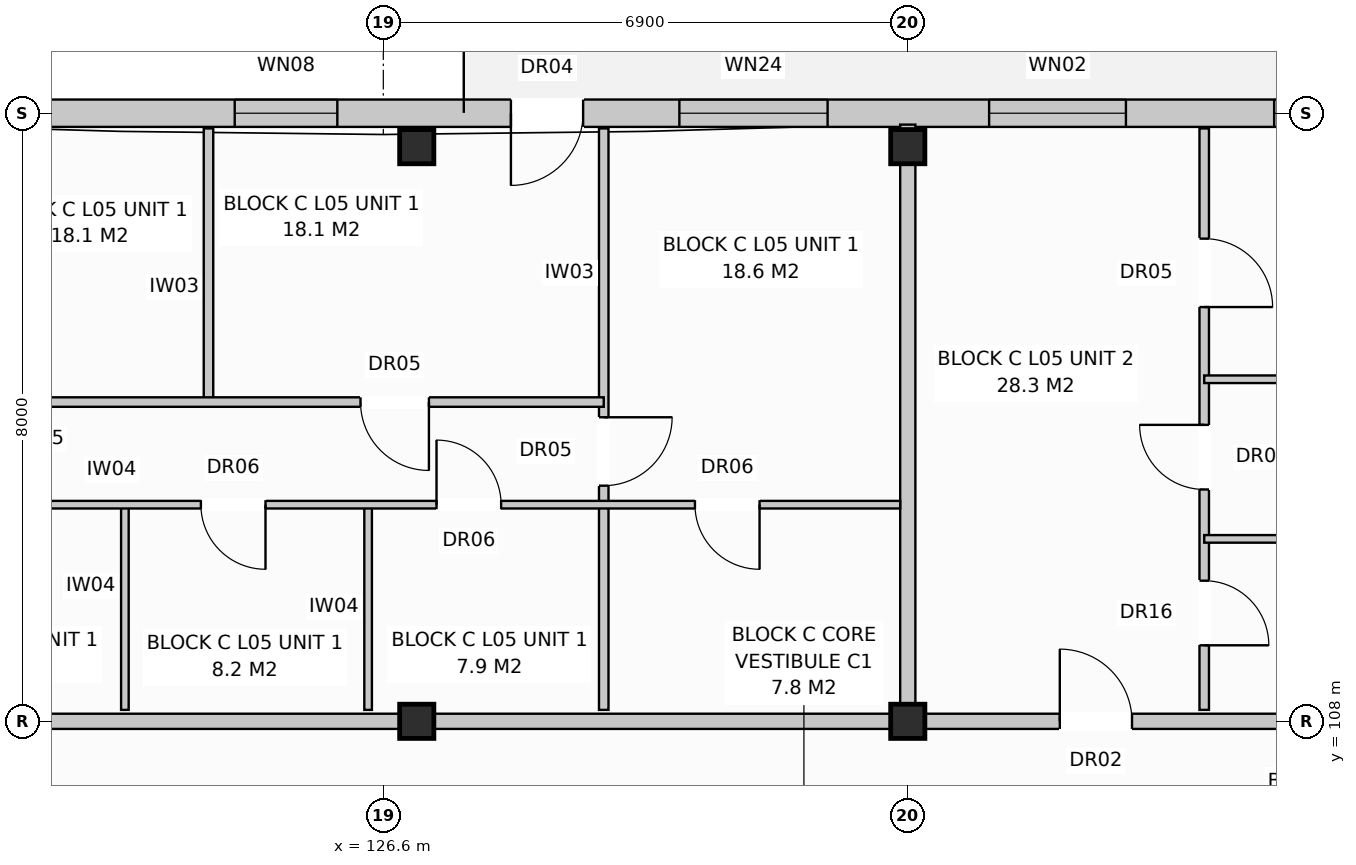
"""IFC4 building model, lengths in metres.
Left out: names, types, materials, properties, quantities, classifications, styles, units other than length and angle.
Written with IfcOpenShell. Run it as: python <this file> out.ifc"""

import sys

from ifc_helpers import new_model, si_unit, direction, frame, frame_2d, origin, origin_with_axes, origin_2d, place, context, subcontext, project, spatial, rectangle, extrude, element, fill, save


model = new_model("IFC4")
c1 = context("Model", 3, precision=1e-05, world=origin(), true_north=direction((0.0, 1.0)))
c2 = subcontext(c1, "Body", "Model", "MODEL_VIEW")
j1 = project(units=[si_unit("LENGTHUNIT", "METRE"), si_unit("PLANEANGLEUNIT", "RADIAN")], contexts=[c1])
p1 = place(None, origin())
s1 = spatial("IfcSite", under=j1, at=p1, CompositionType="ELEMENT")
p2 = place(p1, origin())
s2 = spatial("IfcBuilding", under=s1, at=p2, CompositionType="ELEMENT")
p3 = place(p2, frame((0.0, 0.0, 17.6)))
s3 = spatial("IfcBuildingStorey", under=s2, at=p3, CompositionType="ELEMENT", Elevation=17.6)
for number, where, z_axis, x_axis in (
    (1, (127.04, 108.0, 0.0), (0.0, 0.0, 1.0), (1.0, 0.0, 0.0)),
    (2, (127.04, 115.56, 0.0), (0.0, 0.0, 1.0), (1.0, 0.0, 0.0)),
    (3, (133.5, 108.0, 0.0), (0.0, 0.0, 1.0), (1.0, 0.0, 0.0)),
    (4, (133.5, 115.56, 0.0), (0.0, 0.0, 1.0), (1.0, 0.0, 0.0)),
):
    element("IfcColumn", number, at=place(p3, frame(where, z_axis=z_axis, x_axis=x_axis)), inside=s3, PredefinedType="COLUMN", context=c2, shape_type="SweptSolid", body=[
        extrude(rectangle(XDim=0.45, YDim=0.45, at=origin_2d()), origin(), (0.0, 0.0, 1.0), 3.2),
    ])
p4 = place(p3, frame((112.97, 116.0, 0.0), z_axis=(0.0, 0.0, 1.0), x_axis=(1.0, 0.0, 0.0)))
e5 = element("IfcWall", 5, at=p4, inside=s3, PredefinedType="STANDARD", context=c2, shape_type="SweptSolid", body=[
    extrude(rectangle(XDim=54.86, YDim=0.36, at=frame_2d((27.43, 0.0))), origin(), (0.0, 0.0, 1.0), 2.95),
])
p5 = place(p4, frame((4.891, 0.0, 0.0)))
e6 = element("IfcOpeningElement", 6, at=p5, cuts=e5, PredefinedType="OPENING", context=c2, shape_type="SweptSolid", body=[
    extrude(rectangle(XDim=0.95, YDim=2.1, at=frame_2d((0.475, 1.05))), frame((0.0, 0.192, 0.0), z_axis=(0.0, -1.0, 0.0), x_axis=(1.0, 0.0, 0.0)), (0.0, 0.0, 1.0), 0.384),
])
p6 = place(p4, frame((15.309, 0.0, 0.0)))
e7 = element("IfcOpeningElement", 7, at=p6, cuts=e5, PredefinedType="OPENING", context=c2, shape_type="SweptSolid", body=[
    extrude(rectangle(XDim=0.95, YDim=2.1, at=frame_2d((0.475, 1.05))), frame((0.0, 0.192, 0.0), z_axis=(0.0, -1.0, 0.0), x_axis=(1.0, 0.0, 0.0)), (0.0, 0.0, 1.0), 0.384),
])
p7 = place(p4, frame((31.409, 0.0, 0.0)))
e8 = element("IfcOpeningElement", 8, at=p7, cuts=e5, PredefinedType="OPENING", context=c2, shape_type="SweptSolid", body=[
    extrude(rectangle(XDim=0.95, YDim=2.1, at=frame_2d((0.475, 1.05))), frame((0.0, 0.192, 0.0), z_axis=(0.0, -1.0, 0.0), x_axis=(1.0, 0.0, 0.0)), (0.0, 0.0, 1.0), 0.384),
])
p8 = place(p4, frame((44.309, 0.0, 0.0)))
e9 = element("IfcOpeningElement", 9, at=p8, cuts=e5, PredefinedType="OPENING", context=c2, shape_type="SweptSolid", body=[
    extrude(rectangle(XDim=0.95, YDim=2.1, at=frame_2d((0.475, 1.05))), frame((0.0, 0.192, 0.0), z_axis=(0.0, -1.0, 0.0), x_axis=(1.0, 0.0, 0.0)), (0.0, 0.0, 1.0), 0.384),
])
p9 = place(p4, frame((2.025, 0.0, 0.8)))
e10 = element("IfcOpeningElement", 10, at=p9, cuts=e5, PredefinedType="OPENING", context=c2, shape_type="SweptSolid", body=[
    extrude(rectangle(XDim=1.95, YDim=1.65, at=frame_2d((0.975, 0.825))), frame((0.0, 0.192, 0.0), z_axis=(0.0, -1.0, 0.0), x_axis=(1.0, 0.0, 0.0)), (0.0, 0.0, 1.0), 0.384),
])
p10 = place(p4, frame((8.15, 0.0, 0.72)))
e11 = element("IfcOpeningElement", 11, at=p10, cuts=e5, PredefinedType="OPENING", context=c2, shape_type="SweptSolid", body=[
    extrude(rectangle(XDim=1.1, YDim=1.5, at=frame_2d((0.55, 0.75))), frame((0.0, 0.192, 0.0), z_axis=(0.0, -1.0, 0.0), x_axis=(1.0, 0.0, 0.0)), (0.0, 0.0, 1.0), 0.384),
])
p11 = place(p4, frame((11.675, 0.0, 0.85)))
e12 = element("IfcOpeningElement", 12, at=p11, cuts=e5, PredefinedType="OPENING", context=c2, shape_type="SweptSolid", body=[
    extrude(rectangle(XDim=1.35, YDim=1.6, at=frame_2d((0.675, 0.8))), frame((0.0, 0.192, 0.0), z_axis=(0.0, -1.0, 0.0), x_axis=(1.0, 0.0, 0.0)), (0.0, 0.0, 1.0), 0.384),
])
p12 = place(p4, frame((17.525, 0.0, 0.8)))
e13 = element("IfcOpeningElement", 13, at=p12, cuts=e5, PredefinedType="OPENING", context=c2, shape_type="SweptSolid", body=[
    extrude(rectangle(XDim=1.95, YDim=1.65, at=frame_2d((0.975, 0.825))), frame((0.0, 0.192, 0.0), z_axis=(0.0, -1.0, 0.0), x_axis=(1.0, 0.0, 0.0)), (0.0, 0.0, 1.0), 0.384),
])
p13 = place(p4, frame((21.6, 0.0, 0.8)))
e14 = element("IfcOpeningElement", 14, at=p13, cuts=e5, PredefinedType="OPENING", context=c2, shape_type="SweptSolid", body=[
    extrude(rectangle(XDim=1.8, YDim=1.7, at=frame_2d((0.9, 0.85))), frame((0.0, 0.192, 0.0), z_axis=(0.0, -1.0, 0.0), x_axis=(1.0, 0.0, 0.0)), (0.0, 0.0, 1.0), 0.384),
])
p14 = place(p4, frame((25.35, 0.0, 0.72)))
e15 = element("IfcOpeningElement", 15, at=p14, cuts=e5, PredefinedType="OPENING", context=c2, shape_type="SweptSolid", body=[
    extrude(rectangle(XDim=1.1, YDim=1.5, at=frame_2d((0.55, 0.75))), frame((0.0, 0.192, 0.0), z_axis=(0.0, -1.0, 0.0), x_axis=(1.0, 0.0, 0.0)), (0.0, 0.0, 1.0), 0.384),
])
p15 = place(p4, frame((29.125, 0.0, 0.8)))
e16 = element("IfcOpeningElement", 16, at=p15, cuts=e5, PredefinedType="OPENING", context=c2, shape_type="SweptSolid", body=[
    extrude(rectangle(XDim=1.95, YDim=1.65, at=frame_2d((0.975, 0.825))), frame((0.0, 0.192, 0.0), z_axis=(0.0, -1.0, 0.0), x_axis=(1.0, 0.0, 0.0)), (0.0, 0.0, 1.0), 0.384),
])
p16 = place(p4, frame((34.9, 0.0, 0.8)))
e17 = element("IfcOpeningElement", 17, at=p16, cuts=e5, PredefinedType="OPENING", context=c2, shape_type="SweptSolid", body=[
    extrude(rectangle(XDim=1.8, YDim=1.7, at=frame_2d((0.9, 0.85))), frame((0.0, 0.192, 0.0), z_axis=(0.0, -1.0, 0.0), x_axis=(1.0, 0.0, 0.0)), (0.0, 0.0, 1.0), 0.384),
])
p17 = place(p4, frame((38.45, 0.0, 0.72)))
e18 = element("IfcOpeningElement", 18, at=p17, cuts=e5, PredefinedType="OPENING", context=c2, shape_type="SweptSolid", body=[
    extrude(rectangle(XDim=1.1, YDim=1.5, at=frame_2d((0.55, 0.75))), frame((0.0, 0.192, 0.0), z_axis=(0.0, -1.0, 0.0), x_axis=(1.0, 0.0, 0.0)), (0.0, 0.0, 1.0), 0.384),
])
p18 = place(p4, frame((42.55, 0.0, 0.72)))
e19 = element("IfcOpeningElement", 19, at=p18, cuts=e5, PredefinedType="OPENING", context=c2, shape_type="SweptSolid", body=[
    extrude(rectangle(XDim=1.1, YDim=1.5, at=frame_2d((0.55, 0.75))), frame((0.0, 0.192, 0.0), z_axis=(0.0, -1.0, 0.0), x_axis=(1.0, 0.0, 0.0)), (0.0, 0.0, 1.0), 0.384),
])
p19 = place(p4, frame((45.8, 0.0, 0.8)))
e20 = element("IfcOpeningElement", 20, at=p19, cuts=e5, PredefinedType="OPENING", context=c2, shape_type="SweptSolid", body=[
    extrude(rectangle(XDim=1.8, YDim=1.7, at=frame_2d((0.9, 0.85))), frame((0.0, 0.192, 0.0), z_axis=(0.0, -1.0, 0.0), x_axis=(1.0, 0.0, 0.0)), (0.0, 0.0, 1.0), 0.384),
])
p20 = place(p4, frame((49.15, 0.0, 0.72)))
e21 = element("IfcOpeningElement", 21, at=p20, cuts=e5, PredefinedType="OPENING", context=c2, shape_type="SweptSolid", body=[
    extrude(rectangle(XDim=1.9, YDim=1.85, at=frame_2d((0.95, 0.925))), frame((0.0, 0.192, 0.0), z_axis=(0.0, -1.0, 0.0), x_axis=(1.0, 0.0, 0.0)), (0.0, 0.0, 1.0), 0.384),
])
p21 = place(p4, frame((52.95, 0.0, 0.72)))
e22 = element("IfcOpeningElement", 22, at=p21, cuts=e5, PredefinedType="OPENING", context=c2, shape_type="SweptSolid", body=[
    extrude(rectangle(XDim=1.1, YDim=1.5, at=frame_2d((0.55, 0.75))), frame((0.0, 0.192, 0.0), z_axis=(0.0, -1.0, 0.0), x_axis=(1.0, 0.0, 0.0)), (0.0, 0.0, 1.0), 0.384),
])
p22 = place(p3, frame((133.5, 108.15, 0.0), z_axis=(0.0, 0.0, 1.0), x_axis=(0.0, 1.0, 0.0)))
e23 = element("IfcWall", 23, at=p22, inside=s3, PredefinedType="PARTITIONING", context=c2, shape_type="SweptSolid", body=[
    extrude(rectangle(XDim=7.7, YDim=0.2, at=frame_2d((3.85, 0.0))), origin(), (0.0, 0.0, 1.0), 2.39),
])
p23 = place(p3, frame((112.8, 108.0, 0.0), z_axis=(0.0, 0.0, 1.0), x_axis=(1.0, 0.0, 0.0)))
e24 = element("IfcWall", 24, at=p23, inside=s3, PredefinedType="PARTITIONING", context=c2, shape_type="SweptSolid", body=[
    extrude(rectangle(XDim=20.7, YDim=0.2, at=frame_2d((10.35, 0.0))), origin(), (0.0, 0.0, 1.0), 2.39),
])
p24 = place(p23, frame((2.4, 0.0, 0.0)))
e25 = element("IfcOpeningElement", 25, at=p24, cuts=e24, PredefinedType="OPENING", context=c2, shape_type="SweptSolid", body=[
    extrude(rectangle(XDim=0.95, YDim=2.15, at=frame_2d((0.475, 1.075))), frame((0.0, 0.112, 0.0), z_axis=(0.0, -1.0, 0.0), x_axis=(1.0, 0.0, 0.0)), (0.0, 0.0, 1.0), 0.224),
])
p25 = place(p3, frame((123.2, 108.15, 0.0), z_axis=(0.0, 0.0, 1.0), x_axis=(0.0, 1.0, 0.0)))
e26 = element("IfcWall", 26, at=p25, inside=s3, PredefinedType="PARTITIONING", context=c2, shape_type="SweptSolid", body=[
    extrude(rectangle(XDim=2.7, YDim=0.1, at=frame_2d((1.35, 0.0))), origin(), (0.0, 0.0, 1.0), 2.95),
])
p26 = place(p3, frame((126.4, 108.15, 0.0), z_axis=(0.0, 0.0, 1.0), x_axis=(0.0, 1.0, 0.0)))
e27 = element("IfcWall", 27, at=p26, inside=s3, PredefinedType="PARTITIONING", context=c2, shape_type="SweptSolid", body=[
    extrude(rectangle(XDim=2.7, YDim=0.1, at=frame_2d((1.35, 0.0))), origin(), (0.0, 0.0, 1.0), 2.39),
])
p27 = place(p3, frame((124.3, 112.2, 0.0), z_axis=(0.0, 0.0, 1.0), x_axis=(0.0, 1.0, 0.0)))
e28 = element("IfcWall", 28, at=p27, inside=s3, PredefinedType="PARTITIONING", context=c2, shape_type="SweptSolid", body=[
    extrude(rectangle(XDim=3.6, YDim=0.125, at=frame_2d((1.8, 0.0))), origin(), (0.0, 0.0, 1.0), 2.95),
])
p28 = place(p3, frame((129.5, 108.15, 0.0), z_axis=(0.0, 0.0, 1.0), x_axis=(0.0, 1.0, 0.0)))
e29 = element("IfcWall", 29, at=p28, inside=s3, PredefinedType="PARTITIONING", context=c2, shape_type="SweptSolid", body=[
    extrude(rectangle(XDim=7.65, YDim=0.125, at=frame_2d((3.825, 0.0))), origin(), (0.0, 0.0, 1.0), 2.95),
])
p29 = place(p28, frame((2.95, 0.0, 0.0)))
e30 = element("IfcOpeningElement", 30, at=p29, cuts=e29, PredefinedType="OPENING", context=c2, shape_type="SweptSolid", body=[
    extrude(rectangle(XDim=0.9, YDim=2.1, at=frame_2d((0.45, 1.05))), frame((0.0, 0.074, 0.0), z_axis=(0.0, -1.0, 0.0), x_axis=(1.0, 0.0, 0.0)), (0.0, 0.0, 1.0), 0.149),
])
p30 = place(p3, frame((119.1, 110.85, 0.0), z_axis=(0.0, 0.0, 1.0), x_axis=(1.0, 0.0, 0.0)))
e31 = element("IfcWall", 31, at=p30, inside=s3, PredefinedType="PARTITIONING", context=c2, shape_type="SweptSolid", body=[
    extrude(rectangle(XDim=14.3, YDim=0.1, at=frame_2d((7.15, 0.0))), origin(), (0.0, 0.0, 1.0), 2.95),
])
p31 = place(p30, frame((1.6, 0.0, 0.0)))
e32 = element("IfcOpeningElement", 32, at=p31, cuts=e31, PredefinedType="OPENING", context=c2, shape_type="SweptSolid", body=[
    extrude(rectangle(XDim=0.9, YDim=2.1, at=frame_2d((0.45, 1.05))), frame((0.0, 0.062, 0.0), z_axis=(0.0, -1.0, 0.0), x_axis=(1.0, 0.0, 0.0)), (0.0, 0.0, 1.0), 0.124),
])
p32 = place(p30, frame((5.1, 0.0, 0.0)))
e33 = element("IfcOpeningElement", 33, at=p32, cuts=e31, PredefinedType="OPENING", context=c2, shape_type="SweptSolid", body=[
    extrude(rectangle(XDim=0.85, YDim=2.05, at=frame_2d((0.425, 1.025))), frame((0.0, 0.062, 0.0), z_axis=(0.0, -1.0, 0.0), x_axis=(1.0, 0.0, 0.0)), (0.0, 0.0, 1.0), 0.124),
])
p33 = place(p30, frame((8.2, 0.0, 0.0)))
e34 = element("IfcOpeningElement", 34, at=p33, cuts=e31, PredefinedType="OPENING", context=c2, shape_type="SweptSolid", body=[
    extrude(rectangle(XDim=0.85, YDim=2.05, at=frame_2d((0.425, 1.025))), frame((0.0, 0.062, 0.0), z_axis=(0.0, -1.0, 0.0), x_axis=(1.0, 0.0, 0.0)), (0.0, 0.0, 1.0), 0.124),
])
p34 = place(p30, frame((11.6, 0.0, 0.0)))
e35 = element("IfcOpeningElement", 35, at=p34, cuts=e31, PredefinedType="OPENING", context=c2, shape_type="SweptSolid", body=[
    extrude(rectangle(XDim=0.85, YDim=2.05, at=frame_2d((0.425, 1.025))), frame((0.0, 0.062, 0.0), z_axis=(0.0, -1.0, 0.0), x_axis=(1.0, 0.0, 0.0)), (0.0, 0.0, 1.0), 0.124),
])
p35 = place(p3, frame((119.1, 112.2, 0.0), z_axis=(0.0, 0.0, 1.0), x_axis=(1.0, 0.0, 0.0)))
e36 = element("IfcWall", 36, at=p35, inside=s3, PredefinedType="PARTITIONING", context=c2, shape_type="SweptSolid", body=[
    extrude(rectangle(XDim=10.4, YDim=0.125, at=frame_2d((5.2, 0.0))), origin(), (0.0, 0.0, 1.0), 2.95),
])
p36 = place(p35, frame((2.0, 0.0, 0.0)))
e37 = element("IfcOpeningElement", 37, at=p36, cuts=e36, PredefinedType="OPENING", context=c2, shape_type="SweptSolid", body=[
    extrude(rectangle(XDim=0.9, YDim=2.1, at=frame_2d((0.45, 1.05))), frame((0.0, 0.074, 0.0), z_axis=(0.0, -1.0, 0.0), x_axis=(1.0, 0.0, 0.0)), (0.0, 0.0, 1.0), 0.149),
])
p37 = place(p35, frame((7.2, 0.0, 0.0)))
e38 = element("IfcOpeningElement", 38, at=p37, cuts=e36, PredefinedType="OPENING", context=c2, shape_type="SweptSolid", body=[
    extrude(rectangle(XDim=0.9, YDim=2.1, at=frame_2d((0.45, 1.05))), frame((0.0, 0.074, 0.0), z_axis=(0.0, -1.0, 0.0), x_axis=(1.0, 0.0, 0.0)), (0.0, 0.0, 1.0), 0.149),
])
p38 = place(p3, frame((133.5, 108.0, 0.0), z_axis=(0.0, 0.0, 1.0), x_axis=(1.0, 0.0, 0.0)))
e39 = element("IfcWall", 39, at=p38, inside=s3, PredefinedType="PARTITIONING", context=c2, shape_type="SweptSolid", body=[
    extrude(rectangle(XDim=6.9, YDim=0.2, at=frame_2d((3.45, 0.0))), origin(), (0.0, 0.0, 1.0), 2.39),
])
p39 = place(p38, frame((2.0, 0.0, 0.0)))
e40 = element("IfcOpeningElement", 40, at=p39, cuts=e39, PredefinedType="OPENING", context=c2, shape_type="SweptSolid", body=[
    extrude(rectangle(XDim=0.95, YDim=2.15, at=frame_2d((0.475, 1.075))), frame((0.0, 0.112, 0.0), z_axis=(0.0, -1.0, 0.0), x_axis=(1.0, 0.0, 0.0)), (0.0, 0.0, 1.0), 0.224),
])
p40 = place(p3, frame((137.4, 108.15, 0.0), z_axis=(0.0, 0.0, 1.0), x_axis=(0.0, 1.0, 0.0)))
e41 = element("IfcWall", 41, at=p40, inside=s3, PredefinedType="PARTITIONING", context=c2, shape_type="SweptSolid", body=[
    extrude(rectangle(XDim=7.65, YDim=0.125, at=frame_2d((3.825, 0.0))), origin(), (0.0, 0.0, 1.0), 2.95),
])
p41 = place(p40, frame((0.85, 0.0, 0.0)))
e42 = element("IfcOpeningElement", 42, at=p41, cuts=e41, PredefinedType="OPENING", context=c2, shape_type="SweptSolid", body=[
    extrude(rectangle(XDim=0.85, YDim=2.1, at=frame_2d((0.425, 1.05))), frame((0.0, 0.074, 0.0), z_axis=(0.0, -1.0, 0.0), x_axis=(1.0, 0.0, 0.0)), (0.0, 0.0, 1.0), 0.149),
])
p42 = place(p40, frame((2.9, 0.0, 0.0)))
e43 = element("IfcOpeningElement", 43, at=p42, cuts=e41, PredefinedType="OPENING", context=c2, shape_type="SweptSolid", body=[
    extrude(rectangle(XDim=0.85, YDim=2.05, at=frame_2d((0.425, 1.025))), frame((0.0, 0.074, 0.0), z_axis=(0.0, -1.0, 0.0), x_axis=(1.0, 0.0, 0.0)), (0.0, 0.0, 1.0), 0.149),
])
p43 = place(p40, frame((5.3, 0.0, 0.0)))
e44 = element("IfcOpeningElement", 44, at=p43, cuts=e41, PredefinedType="OPENING", context=c2, shape_type="SweptSolid", body=[
    extrude(rectangle(XDim=0.9, YDim=2.1, at=frame_2d((0.45, 1.05))), frame((0.0, 0.074, 0.0), z_axis=(0.0, -1.0, 0.0), x_axis=(1.0, 0.0, 0.0)), (0.0, 0.0, 1.0), 0.149),
])
for number, where, z_axis, x_axis in (
    (45, (137.4, 110.4, 0.0), (0.0, 0.0, 1.0), (1.0, 0.0, 0.0)),
    (46, (137.4, 112.5, 0.0), (0.0, 0.0, 1.0), (1.0, 0.0, 0.0)),
):
    element("IfcWall", number, at=place(p3, frame(where, z_axis=z_axis, x_axis=x_axis)), inside=s3, PredefinedType="PARTITIONING", context=c2, shape_type="SweptSolid", body=[
        extrude(rectangle(XDim=2.9, YDim=0.1, at=frame_2d((1.45, 0.0))), origin(), (0.0, 0.0, 1.0), 2.95),
    ])
p44 = place(p6, frame((0.95, 0.0, 0.0), z_axis=(0.0, 0.0, 1.0), x_axis=(-1.0, 0.0, 0.0)))
e47 = element("IfcDoor", 47, at=p44, inside=s3, OperationType="SINGLE_SWING_LEFT", PredefinedType="DOOR", context=c2, shape_type="SweptSolid", body=[
    extrude(rectangle(XDim=0.95, YDim=2.1, at=frame_2d((0.475, 1.05))), frame((0.0, 0.025, 0.0), z_axis=(0.0, -1.0, 0.0), x_axis=(1.0, 0.0, 0.0)), (0.0, 0.0, 1.0), 0.05),
])
fill(e7, e47)
p45 = place(p11, origin_with_axes())
e48 = element("IfcWindow", 48, at=p45, inside=s3, PartitioningType="SINGLE_PANEL", PredefinedType="WINDOW", context=c2, shape_type="SweptSolid", body=[
    extrude(rectangle(XDim=1.35, YDim=1.6, at=frame_2d((0.675, 0.8))), frame((0.0, 0.03, 0.0), z_axis=(0.0, -1.0, 0.0), x_axis=(1.0, 0.0, 0.0)), (0.0, 0.0, 1.0), 0.06),
])
fill(e12, e48)
p46 = place(p12, origin_with_axes())
e49 = element("IfcWindow", 49, at=p46, inside=s3, PartitioningType="SINGLE_PANEL", PredefinedType="WINDOW", context=c2, shape_type="SweptSolid", body=[
    extrude(rectangle(XDim=1.95, YDim=1.65, at=frame_2d((0.975, 0.825))), frame((0.0, 0.03, 0.0), z_axis=(0.0, -1.0, 0.0), x_axis=(1.0, 0.0, 0.0)), (0.0, 0.0, 1.0), 0.06),
])
fill(e13, e49)
p47 = place(p13, origin_with_axes())
e50 = element("IfcWindow", 50, at=p47, inside=s3, PartitioningType="SINGLE_PANEL", PredefinedType="WINDOW", context=c2, shape_type="SweptSolid", body=[
    extrude(rectangle(XDim=1.8, YDim=1.7, at=frame_2d((0.9, 0.85))), frame((0.0, 0.03, 0.0), z_axis=(0.0, -1.0, 0.0), x_axis=(1.0, 0.0, 0.0)), (0.0, 0.0, 1.0), 0.06),
])
fill(e14, e50)
p48 = place(p14, origin_with_axes())
e51 = element("IfcWindow", 51, at=p48, inside=s3, PartitioningType="SINGLE_PANEL", PredefinedType="WINDOW", context=c2, shape_type="SweptSolid", body=[
    extrude(rectangle(XDim=1.1, YDim=1.5, at=frame_2d((0.55, 0.75))), frame((0.0, 0.03, 0.0), z_axis=(0.0, -1.0, 0.0), x_axis=(1.0, 0.0, 0.0)), (0.0, 0.0, 1.0), 0.06),
])
fill(e15, e51)
p49 = place(p29, frame((0.9, 0.0, 0.0), z_axis=(0.0, 0.0, 1.0), x_axis=(-1.0, 0.0, 0.0)))
e52 = element("IfcDoor", 52, at=p49, inside=s3, OperationType="SINGLE_SWING_RIGHT", PredefinedType="DOOR", context=c2, shape_type="SweptSolid", body=[
    extrude(rectangle(XDim=0.9, YDim=2.1, at=frame_2d((0.45, 1.05))), frame((0.0, 0.025, 0.0), z_axis=(0.0, -1.0, 0.0), x_axis=(1.0, 0.0, 0.0)), (0.0, 0.0, 1.0), 0.05),
])
fill(e30, e52)
p50 = place(p32, frame((0.85, 0.0, 0.0), z_axis=(0.0, 0.0, 1.0), x_axis=(-1.0, 0.0, 0.0)))
e53 = element("IfcDoor", 53, at=p50, inside=s3, OperationType="SINGLE_SWING_RIGHT", PredefinedType="DOOR", context=c2, shape_type="SweptSolid", body=[
    extrude(rectangle(XDim=0.85, YDim=2.05, at=frame_2d((0.425, 1.025))), frame((0.0, 0.025, 0.0), z_axis=(0.0, -1.0, 0.0), x_axis=(1.0, 0.0, 0.0)), (0.0, 0.0, 1.0), 0.05),
])
fill(e33, e53)
p51 = place(p33, origin_with_axes())
e54 = element("IfcDoor", 54, at=p51, inside=s3, OperationType="SINGLE_SWING_LEFT", PredefinedType="DOOR", context=c2, shape_type="SweptSolid", body=[
    extrude(rectangle(XDim=0.85, YDim=2.05, at=frame_2d((0.425, 1.025))), frame((0.0, 0.025, 0.0), z_axis=(0.0, -1.0, 0.0), x_axis=(1.0, 0.0, 0.0)), (0.0, 0.0, 1.0), 0.05),
])
fill(e34, e54)
p52 = place(p34, frame((0.85, 0.0, 0.0), z_axis=(0.0, 0.0, 1.0), x_axis=(-1.0, 0.0, 0.0)))
e55 = element("IfcDoor", 55, at=p52, inside=s3, OperationType="SINGLE_SWING_RIGHT", PredefinedType="DOOR", context=c2, shape_type="SweptSolid", body=[
    extrude(rectangle(XDim=0.85, YDim=2.05, at=frame_2d((0.425, 1.025))), frame((0.0, 0.025, 0.0), z_axis=(0.0, -1.0, 0.0), x_axis=(1.0, 0.0, 0.0)), (0.0, 0.0, 1.0), 0.05),
])
fill(e35, e55)
p53 = place(p37, frame((0.9, 0.0, 0.0), z_axis=(0.0, 0.0, 1.0), x_axis=(-1.0, 0.0, 0.0)))
e56 = element("IfcDoor", 56, at=p53, inside=s3, OperationType="SINGLE_SWING_RIGHT", PredefinedType="DOOR", context=c2, shape_type="SweptSolid", body=[
    extrude(rectangle(XDim=0.9, YDim=2.1, at=frame_2d((0.45, 1.05))), frame((0.0, 0.025, 0.0), z_axis=(0.0, -1.0, 0.0), x_axis=(1.0, 0.0, 0.0)), (0.0, 0.0, 1.0), 0.05),
])
fill(e38, e56)
p54 = place(p39, origin_with_axes())
e57 = element("IfcDoor", 57, at=p54, inside=s3, OperationType="SINGLE_SWING_LEFT", PredefinedType="DOOR", context=c2, shape_type="SweptSolid", body=[
    extrude(rectangle(XDim=0.95, YDim=2.15, at=frame_2d((0.475, 1.075))), frame((0.0, 0.025, 0.0), z_axis=(0.0, -1.0, 0.0), x_axis=(1.0, 0.0, 0.0)), (0.0, 0.0, 1.0), 0.05),
])
fill(e40, e57)
p55 = place(p41, frame((0.85, 0.0, 0.0), z_axis=(0.0, 0.0, 1.0), x_axis=(-1.0, 0.0, 0.0)))
e58 = element("IfcDoor", 58, at=p55, inside=s3, OperationType="SINGLE_SWING_LEFT", PredefinedType="DOOR", context=c2, shape_type="SweptSolid", body=[
    extrude(rectangle(XDim=0.85, YDim=2.1, at=frame_2d((0.425, 1.05))), frame((0.0, 0.025, 0.0), z_axis=(0.0, -1.0, 0.0), x_axis=(1.0, 0.0, 0.0)), (0.0, 0.0, 1.0), 0.05),
])
fill(e42, e58)
p56 = place(p42, origin_with_axes())
e59 = element("IfcDoor", 59, at=p56, inside=s3, OperationType="SINGLE_SWING_RIGHT", PredefinedType="DOOR", context=c2, shape_type="SweptSolid", body=[
    extrude(rectangle(XDim=0.85, YDim=2.05, at=frame_2d((0.425, 1.025))), frame((0.0, 0.025, 0.0), z_axis=(0.0, -1.0, 0.0), x_axis=(1.0, 0.0, 0.0)), (0.0, 0.0, 1.0), 0.05),
])
fill(e43, e59)
p57 = place(p43, frame((0.9, 0.0, 0.0), z_axis=(0.0, 0.0, 1.0), x_axis=(-1.0, 0.0, 0.0)))
e60 = element("IfcDoor", 60, at=p57, inside=s3, OperationType="SINGLE_SWING_LEFT", PredefinedType="DOOR", context=c2, shape_type="SweptSolid", body=[
    extrude(rectangle(XDim=0.9, YDim=2.1, at=frame_2d((0.45, 1.05))), frame((0.0, 0.025, 0.0), z_axis=(0.0, -1.0, 0.0), x_axis=(1.0, 0.0, 0.0)), (0.0, 0.0, 1.0), 0.05),
])
fill(e44, e60)
save(model, sys.argv[1])
